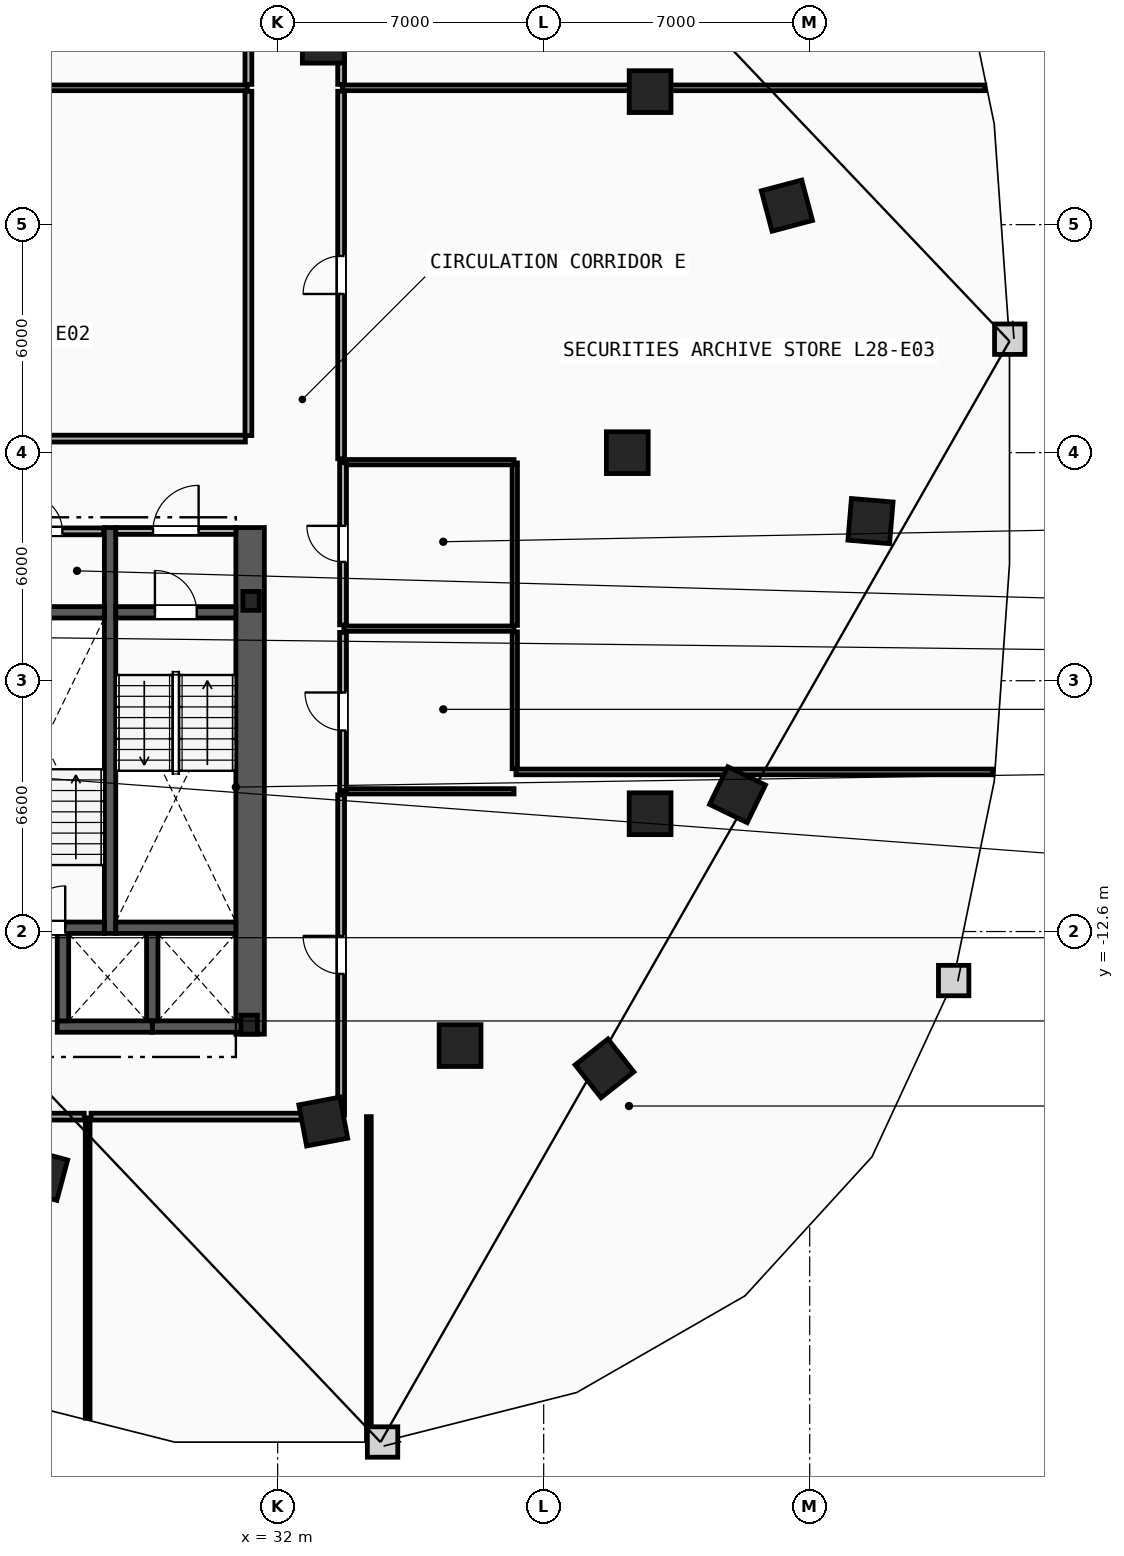
"""IFC4 building model, lengths in metres.
Left out: names, types, materials, properties, quantities, classifications, styles, units other than length and angle.
Written with IfcOpenShell. Run it as: python <this file> out.ifc"""

import sys

from ifc_helpers import new_model, si_unit, direction, frame, frame_2d, origin, origin_2d, place, context, subcontext, project, spatial, rectangle, i_section, extrude, element, fill, save


model = new_model("IFC4")
c1 = context("Model", 3, precision=1e-05, world=origin(), true_north=direction((0.0, 1.0)))
c2 = subcontext(c1, "Body", "Model", "MODEL_VIEW")
j1 = project(units=[si_unit("LENGTHUNIT", "METRE"), si_unit("PLANEANGLEUNIT", "RADIAN")], contexts=[c1])
p1 = place(None, origin())
s1 = spatial("IfcSite", under=j1, at=p1, CompositionType="ELEMENT")
p2 = place(p1, origin())
s2 = spatial("IfcBuilding", under=s1, at=p2, CompositionType="ELEMENT")
p3 = place(p2, frame((0.0, 0.0, 110.6)))
s3 = spatial("IfcBuildingStorey", under=s2, at=p3, CompositionType="ELEMENT", Elevation=110.6)
for number, where, z_axis, x_axis in (
    (1, (31.3, -3.9, 0.0), (0.0, 0.0, 1.0), (1.0, 0.0, 0.0)),
    (2, (31.25, -15.05, 0.0), (0.0, 0.0, 1.0), (1.0, 0.0, 0.0)),
):
    element("IfcColumn", number, at=place(p3, frame(where, z_axis=z_axis, x_axis=x_axis)), inside=s3, PredefinedType="COLUMN", context=c2, shape_type="SweptSolid", body=[
        extrude(i_section(OverallWidth=0.432, OverallDepth=0.498, WebThickness=0.056, FlangeThickness=0.089, FilletRadius=0.018, at=origin_2d()), origin(), (0.0, 0.0, 1.0), 3.6),
    ])
for number, where, z_axis, x_axis in (
    (3, (41.2, 0.0, 0.0), (0.0, 0.0, 1.0), (1.0, 0.0, 0.0)),
    (4, (41.8, -9.5, 0.0), (0.0, 0.0, 1.0), (1.0, 0.0, 0.0)),
    (5, (36.8, -15.6, 0.0), (0.0, 0.0, 1.0), (1.0, 0.0, 0.0)),
    (6, (41.8, 9.5, 0.0), (0.0, 0.0, 1.0), (1.0, 0.0, 0.0)),
    (7, (33.2, 10.8, 0.0), (0.0, 0.0, 1.0), (1.0, 0.0, 0.0)),
    (8, (25.8, -19.0, 0.0), (0.0, 0.0, 1.0), (0.966, -0.259, 0.0)),
    (9, (33.2, -17.6, 0.0), (0.0, 0.0, 1.0), (0.983, 0.186, 0.0)),
    (10, (40.6, -16.2, 0.0), (0.0, 0.0, 1.0), (0.785, 0.619, 0.0)),
    (11, (44.1, -9.0, 0.0), (0.0, 0.0, 1.0), (0.437, 0.899, 0.0)),
    (12, (47.6, -1.8, 0.0), (0.0, 0.0, 1.0), (0.084, 0.997, 0.0)),
    (13, (45.4, 6.5, 0.0), (0.0, 0.0, 1.0), (-0.256, 0.967, 0.0)),
):
    element("IfcColumn", number, at=place(p3, frame(where, z_axis=z_axis, x_axis=x_axis)), inside=s3, PredefinedType="COLUMN", context=c2, shape_type="SweptSolid", body=[
        extrude(rectangle(XDim=1.1, YDim=1.1, at=origin_2d()), origin(), (0.0, 0.0, 1.0), 3.6),
    ])
p4 = place(p3, frame((31.275, -15.3, 0.0), z_axis=(0.0, 0.0, 1.0), x_axis=(0.0, 1.0, 0.0)))
e14 = element("IfcWall", 14, at=p4, inside=s3, PredefinedType="SHEAR", context=c2, shape_type="SweptSolid", body=[
    extrude(rectangle(XDim=13.33, YDim=0.75, at=frame_2d((6.665, 0.0))), origin(), (0.0, 0.0, 1.0), 3.3),
])
p5 = place(p3, frame((27.59, -12.65, 0.0), z_axis=(0.0, 0.0, 1.0), x_axis=(0.0, 1.0, 0.0)))
e15 = element("IfcWall", 15, at=p5, inside=s3, PredefinedType="SHEAR", context=c2, shape_type="SweptSolid", body=[
    extrude(rectangle(XDim=10.68, YDim=0.3, at=frame_2d((5.34, 0.0))), origin(), (0.0, 0.0, 1.0), 3.3),
])
p6 = place(p3, frame((27.74, -4.2, 0.0), z_axis=(0.0, 0.0, 1.0), x_axis=(1.0, 0.0, 0.0)))
e16 = element("IfcWall", 16, at=p6, inside=s3, PredefinedType="SHEAR", context=c2, shape_type="SweptSolid", body=[
    extrude(rectangle(XDim=3.16, YDim=0.3, at=frame_2d((1.58, 0.0))), origin(), (0.0, 0.0, 1.0), 3.3),
])
p7 = place(p6, frame((1.03, 0.0, 0.0)))
e17 = element("IfcOpeningElement", 17, at=p7, cuts=e16, PredefinedType="OPENING", context=c2, shape_type="SweptSolid", body=[
    extrude(rectangle(XDim=1.1, YDim=2.15, at=frame_2d((0.55, 1.075))), frame((0.0, 0.16, 0.0), z_axis=(0.0, -1.0, 0.0), x_axis=(1.0, 0.0, 0.0)), (0.0, 0.0, 1.0), 0.32),
])
p8 = place(p3, frame((27.74, -12.5, 0.0), z_axis=(0.0, 0.0, 1.0), x_axis=(1.0, 0.0, 0.0)))
e18 = element("IfcWall", 18, at=p8, inside=s3, PredefinedType="SHEAR", context=c2, shape_type="SweptSolid", body=[
    extrude(rectangle(XDim=3.16, YDim=0.3, at=frame_2d((1.58, 0.0))), origin(), (0.0, 0.0, 1.0), 3.3),
])
p9 = place(p3, frame((24.28, -12.5, 0.0), z_axis=(0.0, 0.0, 1.0), x_axis=(1.0, 0.0, 0.0)))
e19 = element("IfcWall", 19, at=p9, inside=s3, PredefinedType="SHEAR", context=c2, shape_type="SweptSolid", body=[
    extrude(rectangle(XDim=3.16, YDim=0.3, at=frame_2d((1.58, 0.0))), origin(), (0.0, 0.0, 1.0), 3.3),
])
p10 = place(p9, frame((1.03, 0.0, 0.0)))
e20 = element("IfcOpeningElement", 20, at=p10, cuts=e19, PredefinedType="OPENING", context=c2, shape_type="SweptSolid", body=[
    extrude(rectangle(XDim=1.1, YDim=2.15, at=frame_2d((0.55, 1.075))), frame((0.0, 0.16, 0.0), z_axis=(0.0, -1.0, 0.0), x_axis=(1.0, 0.0, 0.0)), (0.0, 0.0, 1.0), 0.32),
])
p11 = place(p3, frame((24.28, -4.2, 0.0), z_axis=(0.0, 0.0, 1.0), x_axis=(1.0, 0.0, 0.0)))
e21 = element("IfcWall", 21, at=p11, inside=s3, PredefinedType="SHEAR", context=c2, shape_type="SweptSolid", body=[
    extrude(rectangle(XDim=3.16, YDim=0.3, at=frame_2d((1.58, 0.0))), origin(), (0.0, 0.0, 1.0), 3.3),
])
p12 = place(p3, frame((27.74, -2.06, 0.0), z_axis=(0.0, 0.0, 1.0), x_axis=(1.0, 0.0, 0.0)))
e22 = element("IfcWall", 22, at=p12, inside=s3, PredefinedType="PARTITIONING", context=c2, shape_type="SweptSolid", body=[
    extrude(rectangle(XDim=3.16, YDim=0.18, at=frame_2d((1.58, 0.0))), origin(), (0.0, 0.0, 1.0), 3.3),
])
p13 = place(p12, frame((0.98, 0.0, 0.0)))
e23 = element("IfcOpeningElement", 23, at=p13, cuts=e22, PredefinedType="OPENING", context=c2, shape_type="SweptSolid", body=[
    extrude(rectangle(XDim=1.2, YDim=2.15, at=frame_2d((0.6, 1.075))), frame((0.0, 0.1, 0.0), z_axis=(0.0, -1.0, 0.0), x_axis=(1.0, 0.0, 0.0)), (0.0, 0.0, 1.0), 0.2),
])
p14 = place(p3, frame((28.7, -15.1, 0.0), z_axis=(0.0, 0.0, 1.0), x_axis=(1.0, 0.0, 0.0)))
e24 = element("IfcWall", 24, at=p14, inside=s3, PredefinedType="SHEAR", context=c2, shape_type="SweptSolid", body=[
    extrude(rectangle(XDim=2.5, YDim=0.3, at=frame_2d((1.25, 0.0))), origin(), (0.0, 0.0, 1.0), 3.3),
])
p15 = place(p3, frame((28.7, -14.95, 0.0), z_axis=(0.0, 0.0, 1.0), x_axis=(0.0, 1.0, 0.0)))
e25 = element("IfcWall", 25, at=p15, inside=s3, PredefinedType="SHEAR", context=c2, shape_type="SweptSolid", body=[
    extrude(rectangle(XDim=2.3, YDim=0.3, at=frame_2d((1.15, 0.0))), origin(), (0.0, 0.0, 1.0), 3.3),
])
p16 = place(p3, frame((26.2, -15.1, 0.0), z_axis=(0.0, 0.0, 1.0), x_axis=(1.0, 0.0, 0.0)))
e26 = element("IfcWall", 26, at=p16, inside=s3, PredefinedType="SHEAR", context=c2, shape_type="SweptSolid", body=[
    extrude(rectangle(XDim=2.5, YDim=0.3, at=frame_2d((1.25, 0.0))), origin(), (0.0, 0.0, 1.0), 3.3),
])
p17 = place(p3, frame((26.35, -14.95, 0.0), z_axis=(0.0, 0.0, 1.0), x_axis=(0.0, 1.0, 0.0)))
e27 = element("IfcWall", 27, at=p17, inside=s3, PredefinedType="SHEAR", context=c2, shape_type="SweptSolid", body=[
    extrude(rectangle(XDim=2.3, YDim=0.3, at=frame_2d((1.15, 0.0))), origin(), (0.0, 0.0, 1.0), 3.3),
])
p18 = place(p3, frame((24.3, -2.07, 0.0), z_axis=(0.0, 0.0, 1.0), x_axis=(1.0, 0.0, 0.0)))
e28 = element("IfcWall", 28, at=p18, inside=s3, PredefinedType="PARTITIONING", context=c2, shape_type="SweptSolid", body=[
    extrude(rectangle(XDim=3.12, YDim=0.18, at=frame_2d((1.56, 0.0))), origin(), (0.0, 0.0, 1.0), 3.3),
])
p19 = place(p18, frame((1.085, 0.0, 0.0)))
e29 = element("IfcOpeningElement", 29, at=p19, cuts=e28, PredefinedType="OPENING", context=c2, shape_type="SweptSolid", body=[
    extrude(rectangle(XDim=0.95, YDim=2.1, at=frame_2d((0.475, 1.05))), frame((0.0, 0.1, 0.0), z_axis=(0.0, -1.0, 0.0), x_axis=(1.0, 0.0, 0.0)), (0.0, 0.0, 1.0), 0.2),
])
p20 = place(p3, frame((38.24, -8.315, 0.0), z_axis=(0.0, 0.0, 1.0), x_axis=(0.0, 1.0, 0.0)))
e30 = element("IfcWall", 30, at=p20, inside=s3, PredefinedType="PARTITIONING", context=c2, shape_type="SweptSolid", body=[
    extrude(rectangle(XDim=3.6, YDim=0.14, at=frame_2d((1.8, 0.0))), origin(), (0.0, 0.0, 1.0), 3.3),
])
p21 = place(p3, frame((38.24, -4.545, 0.0), z_axis=(0.0, 0.0, 1.0), x_axis=(0.0, 1.0, 0.0)))
e31 = element("IfcWall", 31, at=p21, inside=s3, PredefinedType="PARTITIONING", context=c2, shape_type="SweptSolid", body=[
    extrude(rectangle(XDim=4.275, YDim=0.14, at=frame_2d((2.137, 0.0))), origin(), (0.0, 0.0, 1.0), 3.3),
])
for number, where, z_axis, x_axis in (
    (32, (33.74, -0.25, 0.0), (0.0, 0.0, 1.0), (1.0, 0.0, 0.0)),
    (33, (33.74, -4.63, 0.0), (0.0, 0.0, 1.0), (1.0, 0.0, 0.0)),
    (34, (33.74, -8.91, 0.0), (0.0, 0.0, 1.0), (1.0, 0.0, 0.0)),
):
    element("IfcWall", number, at=place(p3, frame(where, z_axis=z_axis, x_axis=x_axis)), inside=s3, PredefinedType="PARTITIONING", context=c2, shape_type="SweptSolid", body=[
        extrude(rectangle(XDim=4.48, YDim=0.14, at=frame_2d((2.24, 0.0))), origin(), (0.0, 0.0, 1.0), 3.3),
    ])
p22 = place(p3, frame((33.72, -4.53, 0.0), z_axis=(0.0, 0.0, 1.0), x_axis=(0.0, 1.0, 0.0)))
e35 = element("IfcWall", 35, at=p22, inside=s3, PredefinedType="PARTITIONING", context=c2, shape_type="SweptSolid", body=[
    extrude(rectangle(XDim=4.26, YDim=0.18, at=frame_2d((2.13, 0.0))), origin(), (0.0, 0.0, 1.0), 3.3),
])
p23 = place(p22, frame((1.655, 0.0, 0.0)))
e36 = element("IfcOpeningElement", 36, at=p23, cuts=e35, PredefinedType="OPENING", context=c2, shape_type="SweptSolid", body=[
    extrude(rectangle(XDim=0.95, YDim=2.1, at=frame_2d((0.475, 1.05))), frame((0.0, 0.1, 0.0), z_axis=(0.0, -1.0, 0.0), x_axis=(1.0, 0.0, 0.0)), (0.0, 0.0, 1.0), 0.2),
])
p24 = place(p3, frame((33.72, -8.89, 0.0), z_axis=(0.0, 0.0, 1.0), x_axis=(0.0, 1.0, 0.0)))
e37 = element("IfcWall", 37, at=p24, inside=s3, PredefinedType="PARTITIONING", context=c2, shape_type="SweptSolid", body=[
    extrude(rectangle(XDim=4.16, YDim=0.18, at=frame_2d((2.08, 0.0))), origin(), (0.0, 0.0, 1.0), 3.3),
])
p25 = place(p24, frame((1.58, 0.0, 0.0)))
e38 = element("IfcOpeningElement", 38, at=p25, cuts=e37, PredefinedType="OPENING", context=c2, shape_type="SweptSolid", body=[
    extrude(rectangle(XDim=1.0, YDim=2.15, at=frame_2d((0.5, 1.075))), frame((0.0, 0.1, 0.0), z_axis=(0.0, -1.0, 0.0), x_axis=(1.0, 0.0, 0.0)), (0.0, 0.0, 1.0), 0.2),
])
p26 = place(p3, frame((13.39, 9.6, 0.0), z_axis=(0.0, 0.0, 1.0), x_axis=(1.0, 0.0, 0.0)))
e39 = element("IfcWall", 39, at=p26, inside=s3, PredefinedType="PARTITIONING", context=c2, shape_type="SweptSolid", body=[
    extrude(rectangle(XDim=17.81, YDim=0.15, at=frame_2d((8.905, 0.0))), origin(), (0.0, 0.0, 1.0), 2.605),
])
p27 = place(p3, frame((33.7, 9.6, 0.0), z_axis=(0.0, 0.0, 1.0), x_axis=(1.0, 0.0, 0.0)))
e40 = element("IfcWall", 40, at=p27, inside=s3, PredefinedType="PARTITIONING", context=c2, shape_type="SweptSolid", body=[
    extrude(rectangle(XDim=16.91, YDim=0.15, at=frame_2d((8.455, 0.0))), origin(), (0.0, 0.0, 1.0), 2.605),
])
p28 = place(p3, frame((38.27, -8.4, 0.0), z_axis=(0.0, 0.0, 1.0), x_axis=(1.0, 0.0, 0.0)))
e41 = element("IfcWall", 41, at=p28, inside=s3, PredefinedType="PARTITIONING", context=c2, shape_type="SweptSolid", body=[
    extrude(rectangle(XDim=12.553, YDim=0.15, at=frame_2d((6.276, 0.0))), origin(), (0.0, 0.0, 1.0), 3.3),
])
p29 = place(p3, frame((27.0, -25.404, 0.0), z_axis=(0.0, 0.0, 1.0), x_axis=(0.0, 1.0, 0.0)))
e42 = element("IfcWall", 42, at=p29, inside=s3, PredefinedType="PARTITIONING", context=c2, shape_type="SweptSolid", body=[
    extrude(rectangle(XDim=7.904, YDim=0.125, at=frame_2d((3.952, 0.0))), origin(), (0.0, 0.0, 1.0), 3.3),
])
p30 = place(p3, frame((34.4, -25.985, 0.0), z_axis=(0.0, 0.0, 1.0), x_axis=(0.0, 1.0, 0.0)))
e43 = element("IfcWall", 43, at=p30, inside=s3, PredefinedType="PARTITIONING", context=c2, shape_type="SweptSolid", body=[
    extrude(rectangle(XDim=8.515, YDim=0.125, at=frame_2d((4.258, 0.0))), origin(), (0.0, 0.0, 1.0), 3.3),
])
p31 = place(p3, frame((33.67, -17.428, 0.0), z_axis=(0.0, 0.0, 1.0), x_axis=(0.0, 1.0, 0.0)))
e44 = element("IfcWall", 44, at=p31, inside=s3, PredefinedType="PARTITIONING", context=c2, shape_type="SweptSolid", body=[
    extrude(rectangle(XDim=8.427, YDim=0.18, at=frame_2d((4.213, 0.0))), origin(), (0.0, 0.0, 1.0), 3.3),
])
p32 = place(p31, frame((3.713, 0.0, 0.0)))
e45 = element("IfcOpeningElement", 45, at=p32, cuts=e44, PredefinedType="OPENING", context=c2, shape_type="SweptSolid", body=[
    extrude(rectangle(XDim=1.0, YDim=2.15, at=frame_2d((0.5, 1.075))), frame((0.0, 0.1, 0.0), z_axis=(0.0, -1.0, 0.0), x_axis=(1.0, 0.0, 0.0)), (0.0, 0.0, 1.0), 0.2),
])
p33 = place(p3, frame((27.09, -17.47, 0.0), z_axis=(0.0, 0.0, 1.0), x_axis=(1.0, 0.0, 0.0)))
e46 = element("IfcWall", 46, at=p33, inside=s3, PredefinedType="PARTITIONING", context=c2, shape_type="SweptSolid", body=[
    extrude(rectangle(XDim=6.538, YDim=0.18, at=frame_2d((3.269, 0.0))), origin(), (0.0, 0.0, 1.0), 3.3),
])
p34 = place(p3, frame((31.15, 0.37, 0.0), z_axis=(0.0, 0.0, 1.0), x_axis=(-1.0, 0.0, 0.0)))
e47 = element("IfcWall", 47, at=p34, inside=s3, PredefinedType="PARTITIONING", context=c2, shape_type="SweptSolid", body=[
    extrude(rectangle(XDim=14.328, YDim=0.18, at=frame_2d((7.164, 0.0))), origin(), (0.0, 0.0, 1.0), 3.3),
])
p35 = place(p34, frame((6.664, 0.0, 0.0)))
e48 = element("IfcOpeningElement", 48, at=p35, cuts=e47, PredefinedType="OPENING", context=c2, shape_type="SweptSolid", body=[
    extrude(rectangle(XDim=1.0, YDim=2.15, at=frame_2d((0.5, 1.075))), frame((0.0, 0.1, 0.0), z_axis=(0.0, -1.0, 0.0), x_axis=(1.0, 0.0, 0.0)), (0.0, 0.0, 1.0), 0.2),
])
p36 = place(p3, frame((16.822, -17.47, 0.0), z_axis=(0.0, 0.0, 1.0), x_axis=(1.0, 0.0, 0.0)))
e49 = element("IfcWall", 49, at=p36, inside=s3, PredefinedType="PARTITIONING", context=c2, shape_type="SweptSolid", body=[
    extrude(rectangle(XDim=10.088, YDim=0.18, at=frame_2d((5.044, 0.0))), origin(), (0.0, 0.0, 1.0), 3.3),
])
p37 = place(p3, frame((31.23, 9.51, 0.0), z_axis=(0.0, 0.0, 1.0), x_axis=(0.0, -1.0, 0.0)))
e50 = element("IfcWall", 50, at=p37, inside=s3, PredefinedType="PARTITIONING", context=c2, shape_type="SweptSolid", body=[
    extrude(rectangle(XDim=9.06, YDim=0.18, at=frame_2d((4.53, 0.0))), origin(), (0.0, 0.0, 1.0), 3.3),
])
p38 = place(p3, frame((33.67, -0.159, 0.0), z_axis=(0.0, 0.0, 1.0), x_axis=(0.0, 1.0, 0.0)))
e51 = element("IfcWall", 51, at=p38, inside=s3, PredefinedType="PARTITIONING", context=c2, shape_type="SweptSolid", body=[
    extrude(rectangle(XDim=9.669, YDim=0.18, at=frame_2d((4.834, 0.0))), origin(), (0.0, 0.0, 1.0), 3.3),
])
p39 = place(p38, frame((4.334, 0.0, 0.0)))
e52 = element("IfcOpeningElement", 52, at=p39, cuts=e51, PredefinedType="OPENING", context=c2, shape_type="SweptSolid", body=[
    extrude(rectangle(XDim=1.0, YDim=2.15, at=frame_2d((0.5, 1.075))), frame((0.0, 0.1, 0.0), z_axis=(0.0, -1.0, 0.0), x_axis=(1.0, 0.0, 0.0)), (0.0, 0.0, 1.0), 0.2),
])
for number, where, z_axis, x_axis in (
    (53, (33.67, 9.69, 0.0), (0.0, 0.0, 1.0), (0.0, 1.0, 0.0)),
    (54, (31.23, 11.4, 0.0), (0.0, 0.0, 1.0), (0.0, -1.0, 0.0)),
):
    element("IfcWall", number, at=place(p3, frame(where, z_axis=z_axis, x_axis=x_axis)), inside=s3, PredefinedType="PARTITIONING", context=c2, shape_type="SweptSolid", body=[
        extrude(rectangle(XDim=1.71, YDim=0.18, at=frame_2d((0.855, 0.0))), origin(), (0.0, 0.0, 1.0), 3.3),
    ])
p40 = place(p7, origin())
e55 = element("IfcDoor", 55, at=p40, inside=s3, OperationType="SINGLE_SWING_LEFT", PredefinedType="DOOR", context=c2, shape_type="SweptSolid", body=[
    extrude(rectangle(XDim=1.1, YDim=2.15, at=frame_2d((0.55, 1.075))), frame((0.0, 0.025, 0.0), z_axis=(0.0, -1.0, 0.0), x_axis=(1.0, 0.0, 0.0)), (0.0, 0.0, 1.0), 0.05),
])
fill(e17, e55)
p41 = place(p10, origin())
e56 = element("IfcDoor", 56, at=p41, inside=s3, OperationType="SINGLE_SWING_RIGHT", PredefinedType="DOOR", context=c2, shape_type="SweptSolid", body=[
    extrude(rectangle(XDim=1.1, YDim=2.15, at=frame_2d((0.55, 1.075))), frame((0.0, 0.025, 0.0), z_axis=(0.0, -1.0, 0.0), x_axis=(1.0, 0.0, 0.0)), (0.0, 0.0, 1.0), 0.05),
])
fill(e20, e56)
p42 = place(p13, origin())
e57 = element("IfcDoor", 57, at=p42, inside=s3, OperationType="SINGLE_SWING_RIGHT", PredefinedType="DOOR", context=c2, shape_type="SweptSolid", body=[
    extrude(rectangle(XDim=1.2, YDim=2.15, at=frame_2d((0.6, 1.075))), frame((0.0, 0.025, 0.0), z_axis=(0.0, -1.0, 0.0), x_axis=(1.0, 0.0, 0.0)), (0.0, 0.0, 1.0), 0.05),
])
fill(e23, e57)
p43 = place(p39, origin())
e58 = element("IfcDoor", 58, at=p43, inside=s3, OperationType="SINGLE_SWING_LEFT", PredefinedType="DOOR", context=c2, shape_type="SweptSolid", body=[
    extrude(rectangle(XDim=1.0, YDim=2.15, at=frame_2d((0.5, 1.075))), frame((0.0, 0.025, 0.0), z_axis=(0.0, -1.0, 0.0), x_axis=(1.0, 0.0, 0.0)), (0.0, 0.0, 1.0), 0.05),
])
fill(e52, e58)
p44 = place(p32, origin())
e59 = element("IfcDoor", 59, at=p44, inside=s3, OperationType="SINGLE_SWING_RIGHT", PredefinedType="DOOR", context=c2, shape_type="SweptSolid", body=[
    extrude(rectangle(XDim=1.0, YDim=2.15, at=frame_2d((0.5, 1.075))), frame((0.0, 0.025, 0.0), z_axis=(0.0, -1.0, 0.0), x_axis=(1.0, 0.0, 0.0)), (0.0, 0.0, 1.0), 0.05),
])
fill(e45, e59)
p45 = place(p23, origin())
e60 = element("IfcDoor", 60, at=p45, inside=s3, OperationType="SINGLE_SWING_RIGHT", PredefinedType="DOOR", context=c2, shape_type="SweptSolid", body=[
    extrude(rectangle(XDim=0.95, YDim=2.1, at=frame_2d((0.475, 1.05))), frame((0.0, 0.025, 0.0), z_axis=(0.0, -1.0, 0.0), x_axis=(1.0, 0.0, 0.0)), (0.0, 0.0, 1.0), 0.05),
])
fill(e36, e60)
p46 = place(p25, origin())
e61 = element("IfcDoor", 61, at=p46, inside=s3, OperationType="SINGLE_SWING_RIGHT", PredefinedType="DOOR", context=c2, shape_type="SweptSolid", body=[
    extrude(rectangle(XDim=1.0, YDim=2.15, at=frame_2d((0.5, 1.075))), frame((0.0, 0.025, 0.0), z_axis=(0.0, -1.0, 0.0), x_axis=(1.0, 0.0, 0.0)), (0.0, 0.0, 1.0), 0.05),
])
fill(e38, e61)
p47 = place(p19, origin())
e62 = element("IfcDoor", 62, at=p47, inside=s3, OperationType="SINGLE_SWING_LEFT", PredefinedType="DOOR", context=c2, shape_type="SweptSolid", body=[
    extrude(rectangle(XDim=0.95, YDim=2.1, at=frame_2d((0.475, 1.05))), frame((0.0, 0.025, 0.0), z_axis=(0.0, -1.0, 0.0), x_axis=(1.0, 0.0, 0.0)), (0.0, 0.0, 1.0), 0.05),
])
fill(e29, e62)
save(model, sys.argv[1])
